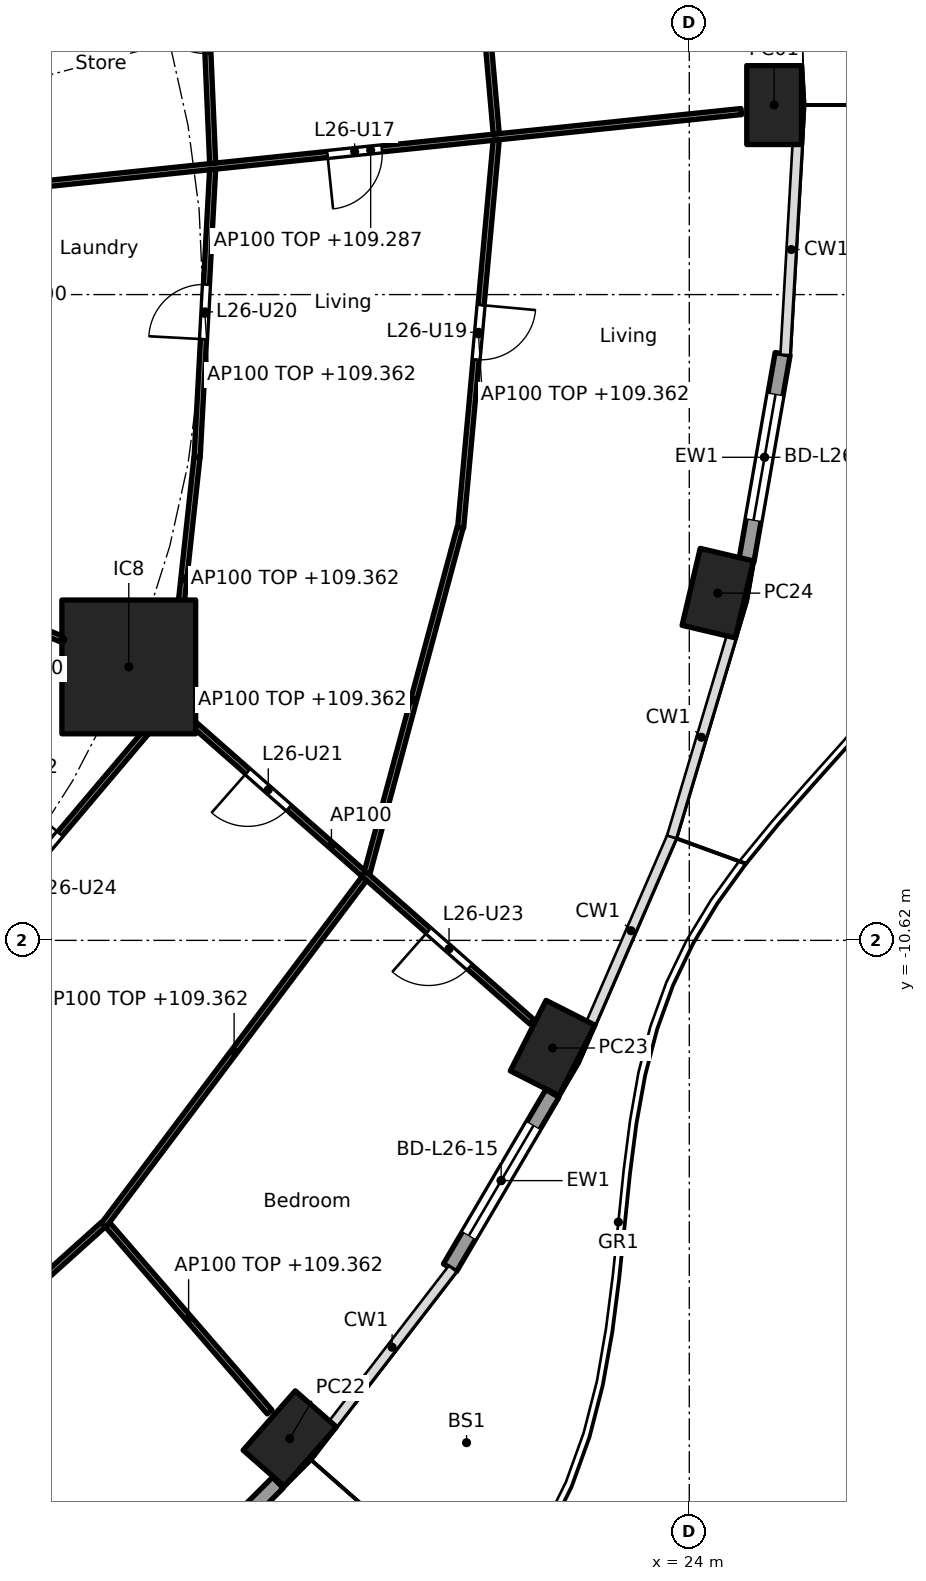
"""IFC4 building model, lengths in metres.
Left out: names, types, materials, properties, quantities, classifications, styles, units other than length and angle.
Written with IfcOpenShell. Run it as: python <this file> out.ifc"""

import sys

from ifc_helpers import new_model, si_unit, direction, frame, frame_2d, origin, origin_2d, place, context, subcontext, project, spatial, rectangle, hollow_rectangle, extrude, element, fill, save


model = new_model("IFC4")
c1 = context("Model", 3, precision=1e-05, world=origin(), true_north=direction((0.0, 1.0)))
c2 = subcontext(c1, "Body", "Model", "MODEL_VIEW")
j1 = project(units=[si_unit("LENGTHUNIT", "METRE"), si_unit("PLANEANGLEUNIT", "RADIAN")], contexts=[c1])
p1 = place(None, origin())
s1 = spatial("IfcSite", under=j1, at=p1, CompositionType="ELEMENT")
p2 = place(p1, origin())
s2 = spatial("IfcBuilding", under=s1, at=p2, CompositionType="ELEMENT")
p3 = place(p2, frame((0.0, 0.0, 106.6)))
s3 = spatial("IfcBuildingStorey", under=s2, at=p3, CompositionType="ELEMENT", Elevation=106.6)
for number, where, z_axis, x_axis in (
    (1, (25.395, 3.118, 0.0), (0.0, 0.0, 1.0), (0.0, 1.0, 0.0)),
    (2, (17.43, -18.813, 0.0), (0.0, 0.0, 1.0), (0.66, 0.751, 0.0)),
    (3, (21.751, -12.39, 0.0), (0.0, 0.0, 1.0), (0.452, 0.892, 0.0)),
    (4, (24.468, -4.91, 0.0), (0.0, 0.0, 1.0), (0.229, 0.973, 0.0)),
):
    element("IfcColumn", number, at=place(p3, frame(where, z_axis=z_axis, x_axis=x_axis)), inside=s3, PredefinedType="COLUMN", context=c2, shape_type="SweptSolid", body=[
        extrude(hollow_rectangle(XDim=1.3, YDim=0.9, WallThickness=0.045, at=origin_2d()), origin(), (0.0, 0.0, 1.0), 3.7),
    ])
p4 = place(p3, frame((14.782, -6.123, 0.0), z_axis=(0.0, 0.0, 1.0), x_axis=(1.0, 0.0, 0.0)))
e5 = element("IfcColumn", 5, at=p4, inside=s3, PredefinedType="COLUMN", context=c2, shape_type="SweptSolid", body=[
    extrude(rectangle(XDim=2.2, YDim=2.2, at=origin_2d()), origin(), (0.0, 0.0, 1.0), 3.7),
])
p5 = place(p3, frame((17.235, -19.537, 0.0), z_axis=(0.0, 0.0, 1.0), x_axis=(-0.707793551437, -0.706419343269, 0.0)))
e6 = element("IfcWall", 6, at=p5, inside=s3, PredefinedType="SOLIDWALL", context=c2, shape_type="SweptSolid", body=[
    extrude(rectangle(XDim=3.198, YDim=0.25, at=frame_2d((1.599, 0.0))), origin(), (0.0, 0.0, 1.0), 3.44),
])
p6 = place(p5, frame((0.549, 0.0, 0.0)))
e7 = element("IfcOpeningElement", 7, at=p6, cuts=e6, PredefinedType="OPENING", context=c2, shape_type="SweptSolid", body=[
    extrude(rectangle(XDim=2.1, YDim=2.4, at=frame_2d((1.05, 1.2))), frame((0.0, 0.135, 0.0), z_axis=(0.0, -1.0, 0.0), x_axis=(1.0, 0.0, 0.0)), (0.0, 0.0, 1.0), 0.27),
])
p7 = place(p3, frame((21.748, -13.137, 0.0), z_axis=(0.0, 0.0, 1.0), x_axis=(-0.506297921217, -0.862358634775, 0.0)))
e8 = element("IfcWall", 8, at=p7, inside=s3, PredefinedType="SOLIDWALL", context=c2, shape_type="SweptSolid", body=[
    extrude(rectangle(XDim=3.325, YDim=0.25, at=frame_2d((1.662, 0.0))), origin(), (0.0, 0.0, 1.0), 3.44),
])
p8 = place(p7, frame((0.612, 0.0, 0.0)))
e9 = element("IfcOpeningElement", 9, at=p8, cuts=e8, PredefinedType="OPENING", context=c2, shape_type="SweptSolid", body=[
    extrude(rectangle(XDim=2.1, YDim=2.4, at=frame_2d((1.05, 1.2))), frame((0.0, 0.135, 0.0), z_axis=(0.0, -1.0, 0.0), x_axis=(1.0, 0.0, 0.0)), (0.0, 0.0, 1.0), 0.27),
])
p9 = place(p3, frame((25.535, -0.974, 0.0), z_axis=(0.0, 0.0, 1.0), x_axis=(-0.172164316671, -0.985068245385, 0.0)))
e10 = element("IfcWall", 10, at=p9, inside=s3, PredefinedType="SOLIDWALL", context=c2, shape_type="SweptSolid", body=[
    extrude(rectangle(XDim=3.454, YDim=0.25, at=frame_2d((1.727, 0.0))), origin(), (0.0, 0.0, 1.0), 3.44),
])
p10 = place(p9, frame((0.677, 0.0, 0.0)))
e11 = element("IfcOpeningElement", 11, at=p10, cuts=e10, PredefinedType="OPENING", context=c2, shape_type="SweptSolid", body=[
    extrude(rectangle(XDim=2.1, YDim=2.4, at=frame_2d((1.05, 1.2))), frame((0.0, 0.135, 0.0), z_axis=(0.0, -1.0, 0.0), x_axis=(1.0, 0.0, 0.0)), (0.0, 0.0, 1.0), 0.27),
])
p11 = place(p3, frame((12.664, 1.745, 0.0), z_axis=(0.0, 0.0, 1.0), x_axis=(0.994662790212, 0.103179134358, 0.0)))
e12 = element("IfcWall", 12, at=p11, inside=s3, PredefinedType="PARTITIONING", context=c2, shape_type="SweptSolid", body=[
    extrude(rectangle(XDim=12.257, YDim=0.1, at=frame_2d((6.128, 0.0))), origin(), (0.0, 0.0, 1.0), 2.687),
])
p12 = place(p11, frame((5.414, 0.0, 0.0)))
e13 = element("IfcOpeningElement", 13, at=p12, cuts=e12, PredefinedType="OPENING", context=c2, shape_type="SweptSolid", body=[
    extrude(rectangle(XDim=0.9, YDim=2.1, at=frame_2d((0.45, 1.05))), frame((0.0, 0.06, 0.0), z_axis=(0.0, -1.0, 0.0), x_axis=(1.0, 0.0, 0.0)), (0.0, 0.0, 1.0), 0.12),
])
p13 = place(p3, frame((16.162, 2.158, 0.0), z_axis=(0.0, 0.0, 1.0), x_axis=(-0.043120653248, 0.999069872063, 0.0)))
e14 = element("IfcWall", 14, at=p13, inside=s3, PredefinedType="PARTITIONING", context=c2, shape_type="SweptSolid", body=[
    extrude(rectangle(XDim=4.518, YDim=0.1, at=frame_2d((2.259, 0.0))), origin(), (0.0, 0.0, 1.0), 3.44),
])
p14 = place(p13, frame((1.809, 0.0, 0.0)))
e15 = element("IfcOpeningElement", 15, at=p14, cuts=e14, PredefinedType="OPENING", context=c2, shape_type="SweptSolid", body=[
    extrude(rectangle(XDim=0.9, YDim=2.1, at=frame_2d((0.45, 1.05))), frame((0.0, 0.06, 0.0), z_axis=(0.0, -1.0, 0.0), x_axis=(1.0, 0.0, 0.0)), (0.0, 0.0, 1.0), 0.12),
])
p15 = place(p3, frame((16.161, 2.058, 0.0), z_axis=(0.0, 0.0, 1.0), x_axis=(-0.053696394729, -0.998557307916, 0.0)))
e16 = element("IfcWall", 16, at=p15, inside=s3, PredefinedType="PARTITIONING", context=c2, shape_type="SweptSolid", body=[
    extrude(rectangle(XDim=4.742, YDim=0.1, at=frame_2d((2.371, 0.0))), origin(), (0.0, 0.0, 1.0), 2.762),
])
p16 = place(p15, frame((1.896, 0.0, 0.0)))
e17 = element("IfcOpeningElement", 17, at=p16, cuts=e16, PredefinedType="OPENING", context=c2, shape_type="SweptSolid", body=[
    extrude(rectangle(XDim=0.9, YDim=2.1, at=frame_2d((0.45, 1.05))), frame((0.0, 0.06, 0.0), z_axis=(0.0, -1.0, 0.0), x_axis=(1.0, 0.0, 0.0)), (0.0, 0.0, 1.0), 0.12),
])
p17 = place(p3, frame((20.825, 2.642, 0.0), z_axis=(0.0, 0.0, 1.0), x_axis=(-0.08776338161, 0.996141349834, 0.0)))
e18 = element("IfcWall", 18, at=p17, inside=s3, PredefinedType="PARTITIONING", context=c2, shape_type="SweptSolid", body=[
    extrude(rectangle(XDim=6.337, YDim=0.1, at=frame_2d((3.168, 0.0))), origin(), (0.0, 0.0, 1.0), 2.762),
])
p18 = place(p17, frame((2.694, 0.0, 0.0)))
e19 = element("IfcOpeningElement", 19, at=p18, cuts=e18, PredefinedType="OPENING", context=c2, shape_type="SweptSolid", body=[
    extrude(rectangle(XDim=0.9, YDim=2.1, at=frame_2d((0.45, 1.05))), frame((0.0, 0.06, 0.0), z_axis=(0.0, -1.0, 0.0), x_axis=(1.0, 0.0, 0.0)), (0.0, 0.0, 1.0), 0.12),
])
p19 = place(p3, frame((20.825, 2.542, 0.0), z_axis=(0.0, 0.0, 1.0), x_axis=(-0.09140211812, -0.995814065377, 0.0)))
e20 = element("IfcWall", 20, at=p19, inside=s3, PredefinedType="PARTITIONING", context=c2, shape_type="SweptSolid", body=[
    extrude(rectangle(XDim=6.403, YDim=0.1, at=frame_2d((3.201, 0.0))), origin(), (0.0, 0.0, 1.0), 2.762),
])
p20 = place(p19, frame((2.726, 0.0, 0.0)))
e21 = element("IfcOpeningElement", 21, at=p20, cuts=e20, PredefinedType="OPENING", context=c2, shape_type="SweptSolid", body=[
    extrude(rectangle(XDim=0.9, YDim=2.1, at=frame_2d((0.45, 1.05))), frame((0.0, 0.06, 0.0), z_axis=(0.0, -1.0, 0.0), x_axis=(1.0, 0.0, 0.0)), (0.0, 0.0, 1.0), 0.12),
])
p21 = place(p3, frame((9.384, -19.768, 0.0), z_axis=(0.0, 0.0, 1.0), x_axis=(0.74387407395, 0.668319805262, 0.0)))
e22 = element("IfcWall", 22, at=p21, inside=s3, PredefinedType="PARTITIONING", context=c2, shape_type="SweptSolid", body=[
    extrude(rectangle(XDim=6.695, YDim=0.1, at=frame_2d((3.348, 0.0))), origin(), (0.0, 0.0, 1.0), 2.762),
])
p22 = place(p21, frame((2.898, 0.0, 0.0)))
e23 = element("IfcOpeningElement", 23, at=p22, cuts=e22, PredefinedType="OPENING", context=c2, shape_type="SweptSolid", body=[
    extrude(rectangle(XDim=0.9, YDim=2.1, at=frame_2d((0.45, 1.05))), frame((0.0, 0.06, 0.0), z_axis=(0.0, -1.0, 0.0), x_axis=(1.0, 0.0, 0.0)), (0.0, 0.0, 1.0), 0.12),
])
p23 = place(p3, frame((11.255, -11.699, 0.0), z_axis=(0.0, 0.0, 1.0), x_axis=(0.64610637779, 0.763247370503, 0.0)))
e24 = element("IfcWall", 24, at=p23, inside=s3, PredefinedType="PARTITIONING", context=c2, shape_type="SweptSolid", body=[
    extrude(rectangle(XDim=6.467, YDim=0.1, at=frame_2d((3.233, 0.0))), origin(), (0.0, 0.0, 1.0), 2.762),
])
p24 = place(p23, frame((2.809, 0.0, 0.0)))
e25 = element("IfcOpeningElement", 25, at=p24, cuts=e24, PredefinedType="OPENING", context=c2, shape_type="SweptSolid", body=[
    extrude(rectangle(XDim=0.9, YDim=2.1, at=frame_2d((0.45, 1.05))), frame((0.0, 0.06, 0.0), z_axis=(0.0, -1.0, 0.0), x_axis=(1.0, 0.0, 0.0)), (0.0, 0.0, 1.0), 0.12),
])
p25 = place(p3, frame((14.435, -15.297, 0.0), z_axis=(0.0, 0.0, 1.0), x_axis=(0.654405107766, -0.756144136345, 0.0)))
e26 = element("IfcWall", 26, at=p25, inside=s3, PredefinedType="PARTITIONING", context=c2, shape_type="SweptSolid", body=[
    extrude(rectangle(XDim=4.07, YDim=0.1, at=frame_2d((2.035, 0.0))), origin(), (0.0, 0.0, 1.0), 2.762),
])
p26 = place(p3, frame((14.372, -15.3, 0.0), z_axis=(0.0, 0.0, 1.0), x_axis=(0.600996629562, 0.79925155693, 0.0)))
e27 = element("IfcWall", 27, at=p26, inside=s3, PredefinedType="PARTITIONING", context=c2, shape_type="SweptSolid", body=[
    extrude(rectangle(XDim=7.13, YDim=0.1, at=frame_2d((3.565, 0.0))), origin(), (0.0, 0.0, 1.0), 2.762),
])
p27 = place(p3, frame((12.657, -5.243, 0.0), z_axis=(0.0, 0.0, 1.0), x_axis=(0.923848837015, -0.382757529444, 0.0)))
e28 = element("IfcWall", 28, at=p27, inside=s3, PredefinedType="PARTITIONING", context=c2, shape_type="SweptSolid", body=[
    extrude(rectangle(XDim=2.25, YDim=0.1, at=frame_2d((1.125, 0.0))), origin(), (0.0, 0.0, 1.0), 3.44),
])
p28 = place(p3, frame((14.82, -6.156, 0.0), z_axis=(0.0, 0.0, 1.0), x_axis=(0.750582231659, -0.660777052808, 0.0)))
e29 = element("IfcWall", 29, at=p28, inside=s3, PredefinedType="PARTITIONING", context=c2, shape_type="SweptSolid", body=[
    extrude(rectangle(XDim=8.781, YDim=0.1, at=frame_2d((4.391, 0.0))), origin(), (0.0, 0.0, 1.0), 3.44),
])
p29 = place(p28, frame((2.557, 0.0, 0.0)))
e30 = element("IfcOpeningElement", 30, at=p29, cuts=e29, PredefinedType="OPENING", context=c2, shape_type="SweptSolid", body=[
    extrude(rectangle(XDim=0.9, YDim=2.1, at=frame_2d((0.45, 1.05))), frame((0.0, 0.06, 0.0), z_axis=(0.0, -1.0, 0.0), x_axis=(1.0, 0.0, 0.0)), (0.0, 0.0, 1.0), 0.12),
])
p30 = place(p28, frame((6.517, 0.0, 0.0)))
e31 = element("IfcOpeningElement", 31, at=p30, cuts=e29, PredefinedType="OPENING", context=c2, shape_type="SweptSolid", body=[
    extrude(rectangle(XDim=0.9, YDim=2.1, at=frame_2d((0.45, 1.05))), frame((0.0, 0.06, 0.0), z_axis=(0.0, -1.0, 0.0), x_axis=(1.0, 0.0, 0.0)), (0.0, 0.0, 1.0), 0.12),
])
p31 = place(p3, frame((15.471, -6.675, 0.0), z_axis=(0.0, 0.0, 1.0), x_axis=(0.107572661837, 0.994197225114, 0.0)))
e32 = element("IfcWall", 32, at=p31, inside=s3, PredefinedType="PARTITIONING", context=c2, shape_type="SweptSolid", body=[
    extrude(rectangle(XDim=4.022, YDim=0.1, at=frame_2d((2.011, 0.0))), origin(), (0.0, 0.0, 1.0), 2.762),
])
p32 = place(p3, frame((18.7, -9.512, 0.0), z_axis=(0.0, 0.0, 1.0), x_axis=(0.260265138035, 0.965537186194, 0.0)))
e33 = element("IfcWall", 33, at=p32, inside=s3, PredefinedType="PARTITIONING", context=c2, shape_type="SweptSolid", body=[
    extrude(rectangle(XDim=5.884, YDim=0.1, at=frame_2d((2.942, 0.0))), origin(), (0.0, 0.0, 1.0), 2.762),
])
p33 = place(p8, origin())
e34 = element("IfcDoor", 34, at=p33, inside=s3, OperationType="SLIDING_TO_LEFT", PredefinedType="DOOR", context=c2, shape_type="SweptSolid", body=[
    extrude(rectangle(XDim=2.1, YDim=2.4, at=frame_2d((1.05, 1.2))), frame((0.0, 0.025, 0.0), z_axis=(0.0, -1.0, 0.0), x_axis=(1.0, 0.0, 0.0)), (0.0, 0.0, 1.0), 0.05),
])
fill(e9, e34)
p34 = place(p10, origin())
e35 = element("IfcDoor", 35, at=p34, inside=s3, OperationType="SLIDING_TO_LEFT", PredefinedType="DOOR", context=c2, shape_type="SweptSolid", body=[
    extrude(rectangle(XDim=2.1, YDim=2.4, at=frame_2d((1.05, 1.2))), frame((0.0, 0.025, 0.0), z_axis=(0.0, -1.0, 0.0), x_axis=(1.0, 0.0, 0.0)), (0.0, 0.0, 1.0), 0.05),
])
fill(e11, e35)
p35 = place(p14, origin())
e36 = element("IfcDoor", 36, at=p35, inside=s3, OperationType="SINGLE_SWING_RIGHT", PredefinedType="DOOR", context=c2, shape_type="SweptSolid", body=[
    extrude(rectangle(XDim=0.9, YDim=2.1, at=frame_2d((0.45, 1.05))), frame((0.0, 0.025, 0.0), z_axis=(0.0, -1.0, 0.0), x_axis=(1.0, 0.0, 0.0)), (0.0, 0.0, 1.0), 0.05),
])
fill(e15, e36)
p36 = place(p12, frame((0.9, 0.0, 0.0), x_axis=(-1.0, 0.0, 0.0)))
e37 = element("IfcDoor", 37, at=p36, inside=s3, OperationType="SINGLE_SWING_RIGHT", PredefinedType="DOOR", context=c2, shape_type="SweptSolid", body=[
    extrude(rectangle(XDim=0.9, YDim=2.1, at=frame_2d((0.45, 1.05))), frame((0.0, 0.025, 0.0), z_axis=(0.0, -1.0, 0.0), x_axis=(1.0, 0.0, 0.0)), (0.0, 0.0, 1.0), 0.05),
])
fill(e13, e37)
p37 = place(p20, origin())
e38 = element("IfcDoor", 38, at=p37, inside=s3, OperationType="SINGLE_SWING_LEFT", PredefinedType="DOOR", context=c2, shape_type="SweptSolid", body=[
    extrude(rectangle(XDim=0.9, YDim=2.1, at=frame_2d((0.45, 1.05))), frame((0.0, 0.025, 0.0), z_axis=(0.0, -1.0, 0.0), x_axis=(1.0, 0.0, 0.0)), (0.0, 0.0, 1.0), 0.05),
])
fill(e21, e38)
p38 = place(p16, frame((0.9, 0.0, 0.0), x_axis=(-1.0, 0.0, 0.0)))
e39 = element("IfcDoor", 39, at=p38, inside=s3, OperationType="SINGLE_SWING_LEFT", PredefinedType="DOOR", context=c2, shape_type="SweptSolid", body=[
    extrude(rectangle(XDim=0.9, YDim=2.1, at=frame_2d((0.45, 1.05))), frame((0.0, 0.025, 0.0), z_axis=(0.0, -1.0, 0.0), x_axis=(1.0, 0.0, 0.0)), (0.0, 0.0, 1.0), 0.05),
])
fill(e17, e39)
p39 = place(p29, frame((0.9, 0.0, 0.0), x_axis=(-1.0, 0.0, 0.0)))
e40 = element("IfcDoor", 40, at=p39, inside=s3, OperationType="SINGLE_SWING_RIGHT", PredefinedType="DOOR", context=c2, shape_type="SweptSolid", body=[
    extrude(rectangle(XDim=0.9, YDim=2.1, at=frame_2d((0.45, 1.05))), frame((0.0, 0.025, 0.0), z_axis=(0.0, -1.0, 0.0), x_axis=(1.0, 0.0, 0.0)), (0.0, 0.0, 1.0), 0.05),
])
fill(e30, e40)
p40 = place(p30, frame((0.9, 0.0, 0.0), x_axis=(-1.0, 0.0, 0.0)))
e41 = element("IfcDoor", 41, at=p40, inside=s3, OperationType="SINGLE_SWING_RIGHT", PredefinedType="DOOR", context=c2, shape_type="SweptSolid", body=[
    extrude(rectangle(XDim=0.9, YDim=2.1, at=frame_2d((0.45, 1.05))), frame((0.0, 0.025, 0.0), z_axis=(0.0, -1.0, 0.0), x_axis=(1.0, 0.0, 0.0)), (0.0, 0.0, 1.0), 0.05),
])
fill(e31, e41)
p41 = place(p24, origin())
e42 = element("IfcDoor", 42, at=p41, inside=s3, OperationType="SINGLE_SWING_RIGHT", PredefinedType="DOOR", context=c2, shape_type="SweptSolid", body=[
    extrude(rectangle(XDim=0.9, YDim=2.1, at=frame_2d((0.45, 1.05))), frame((0.0, 0.025, 0.0), z_axis=(0.0, -1.0, 0.0), x_axis=(1.0, 0.0, 0.0)), (0.0, 0.0, 1.0), 0.05),
])
fill(e25, e42)
save(model, sys.argv[1])
